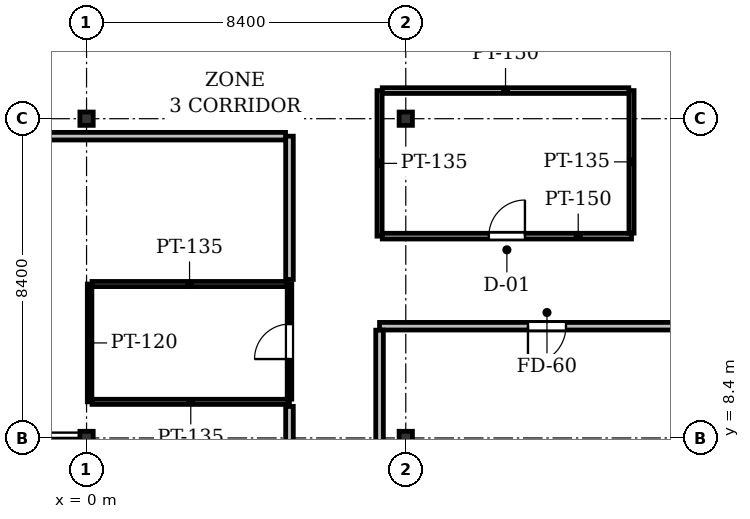
"""IFC4 building model, lengths in metres.
Left out: names, types, materials, properties, quantities, classifications, styles, units other than length and angle.
Written with IfcOpenShell. Run it as: python <this file> out.ifc"""

import sys

from ifc_helpers import new_model, si_unit, direction, frame, frame_2d, origin, origin_2d, place, context, subcontext, project, spatial, rectangle, i_section, extrude, element, fill, save


model = new_model("IFC4")
c1 = context("Model", 3, precision=1e-05, world=origin(), true_north=direction((0.0, 1.0)))
c2 = subcontext(c1, "Body", "Model", "MODEL_VIEW")
j1 = project(units=[si_unit("LENGTHUNIT", "METRE"), si_unit("PLANEANGLEUNIT", "RADIAN")], contexts=[c1])
p1 = place(None, origin())
s1 = spatial("IfcSite", under=j1, at=p1, CompositionType="ELEMENT")
p2 = place(p1, origin())
s2 = spatial("IfcBuilding", under=s1, at=p2, CompositionType="ELEMENT")
p3 = place(p2, frame((0.0, 0.0, 196.0)))
s3 = spatial("IfcBuildingStorey", under=s2, at=p3, CompositionType="ELEMENT", Elevation=196.0)
for number, where, z_axis, x_axis in (
    (1, (0.0, 8.4, 0.0), (0.0, 0.0, 1.0), (1.0, 0.0, 0.0)),
    (2, (0.0, 16.8, 0.0), (0.0, 0.0, 1.0), (1.0, 0.0, 0.0)),
    (3, (8.4, 8.4, 0.0), (0.0, 0.0, 1.0), (1.0, 0.0, 0.0)),
    (4, (8.4, 16.8, 0.0), (0.0, 0.0, 1.0), (1.0, 0.0, 0.0)),
):
    element("IfcColumn", number, at=place(p3, frame(where, z_axis=z_axis, x_axis=x_axis)), inside=s3, PredefinedType="COLUMN", context=c2, shape_type="SweptSolid", body=[
        extrude(i_section(OverallWidth=0.35, OverallDepth=0.35, WebThickness=0.02, FlangeThickness=0.032, at=origin_2d()), origin(), (0.0, 0.0, 1.0), 4.1),
    ])
p4 = place(p3, frame((0.08, 12.45, 0.0), z_axis=(0.0, 0.0, 1.0), x_axis=(0.0, -1.0, 0.0)))
e5 = element("IfcWall", 5, at=p4, inside=s3, PredefinedType="PARTITIONING", context=c2, shape_type="SweptSolid", body=[
    extrude(rectangle(XDim=3.1, YDim=0.12, at=frame_2d((1.55, 0.0))), origin(), (0.0, 0.0, 1.0), 3.223),
])
p5 = place(p3, frame((0.144, 9.35, 0.0), z_axis=(0.0, 0.0, 1.0), x_axis=(1.0, 0.0, 0.0)))
e6 = element("IfcWall", 6, at=p5, inside=s3, PredefinedType="PARTITIONING", context=c2, shape_type="SweptSolid", body=[
    extrude(rectangle(XDim=5.196, YDim=0.135, at=frame_2d((2.598, 0.0))), origin(), (0.0, 0.0, 1.0), 3.518),
])
p6 = place(p3, frame((5.34, 9.421, 0.0), z_axis=(0.0, 0.0, 1.0), x_axis=(0.0, 1.0, 0.0)))
e7 = element("IfcWall", 7, at=p6, inside=s3, PredefinedType="PARTITIONING", context=c2, shape_type="SweptSolid", body=[
    extrude(rectangle(XDim=3.029, YDim=0.12, at=frame_2d((1.514, 0.0))), origin(), (0.0, 0.0, 1.0), 3.825),
])
p7 = place(p6, frame((1.054, 0.0, 0.0)))
e8 = element("IfcOpeningElement", 8, at=p7, cuts=e7, PredefinedType="OPENING", context=c2, shape_type="SweptSolid", body=[
    extrude(rectangle(XDim=0.92, YDim=2.1, at=frame_2d((0.46, 1.05))), frame((0.0, 0.07, 0.0), z_axis=(0.0, -1.0, 0.0), x_axis=(1.0, 0.0, 0.0)), (0.0, 0.0, 1.0), 0.14),
])
p8 = place(p3, frame((5.276, 12.45, 0.0), z_axis=(0.0, 0.0, 1.0), x_axis=(-1.0, 0.0, 0.0)))
e9 = element("IfcWall", 9, at=p8, inside=s3, PredefinedType="PARTITIONING", context=c2, shape_type="SweptSolid", body=[
    extrude(rectangle(XDim=5.132, YDim=0.135, at=frame_2d((2.566, 0.0))), origin(), (0.0, 0.0, 1.0), 3.518),
])
p9 = place(p3, frame((7.71, 17.54, 0.0), z_axis=(0.0, 0.0, 1.0), x_axis=(0.0, -1.0, 0.0)))
e10 = element("IfcWall", 10, at=p9, inside=s3, PredefinedType="PARTITIONING", context=c2, shape_type="SweptSolid", body=[
    extrude(rectangle(XDim=3.83, YDim=0.135, at=frame_2d((1.915, 0.0))), origin(), (0.0, 0.0, 1.0), 3.365),
])
p10 = place(p3, frame((7.781, 13.71, 0.0), z_axis=(0.0, 0.0, 1.0), x_axis=(1.0, 0.0, 0.0)))
e11 = element("IfcWall", 11, at=p10, inside=s3, PredefinedType="PARTITIONING", context=c2, shape_type="SweptSolid", body=[
    extrude(rectangle(XDim=6.559, YDim=0.15, at=frame_2d((3.279, 0.0))), origin(), (0.0, 0.0, 1.0), 3.371),
])
p11 = place(p10, frame((2.804, 0.0, 0.0)))
e12 = element("IfcOpeningElement", 12, at=p11, cuts=e11, PredefinedType="OPENING", context=c2, shape_type="SweptSolid", body=[
    extrude(rectangle(XDim=0.95, YDim=2.15, at=frame_2d((0.475, 1.075))), frame((0.0, 0.085, 0.0), z_axis=(0.0, -1.0, 0.0), x_axis=(1.0, 0.0, 0.0)), (0.0, 0.0, 1.0), 0.17),
])
p12 = place(p3, frame((14.34, 13.789, 0.0), z_axis=(0.0, 0.0, 1.0), x_axis=(0.0, 1.0, 0.0)))
e13 = element("IfcWall", 13, at=p12, inside=s3, PredefinedType="PARTITIONING", context=c2, shape_type="SweptSolid", body=[
    extrude(rectangle(XDim=3.751, YDim=0.135, at=frame_2d((1.875, 0.0))), origin(), (0.0, 0.0, 1.0), 3.365),
])
p13 = place(p3, frame((14.269, 17.54, 0.0), z_axis=(0.0, 0.0, 1.0), x_axis=(-1.0, 0.0, 0.0)))
e14 = element("IfcWall", 14, at=p13, inside=s3, PredefinedType="PARTITIONING", context=c2, shape_type="SweptSolid", body=[
    extrude(rectangle(XDim=6.487, YDim=0.15, at=frame_2d((3.244, 0.0))), origin(), (0.0, 0.0, 1.0), 3.371),
])
p14 = place(p3, frame((16.521, 11.34, 0.0), z_axis=(0.0, 0.0, 1.0), x_axis=(-1.0, 0.0, 0.0)))
e15 = element("IfcWall", 15, at=p14, inside=s3, PredefinedType="PARTITIONING", context=c2, shape_type="SweptSolid", body=[
    extrude(rectangle(XDim=8.811, YDim=0.2, at=frame_2d((4.406, 0.0))), origin(), (0.0, 0.0, 1.0), 3.371),
])
p15 = place(p14, frame((3.906, 0.0, 0.0)))
e16 = element("IfcOpeningElement", 16, at=p15, cuts=e15, PredefinedType="OPENING", context=c2, shape_type="SweptSolid", body=[
    extrude(rectangle(XDim=1.0, YDim=2.15, at=frame_2d((0.5, 1.075))), frame((0.0, 0.11, 0.0), z_axis=(0.0, -1.0, 0.0), x_axis=(1.0, 0.0, 0.0)), (0.0, 0.0, 1.0), 0.22),
])
p16 = place(p3, frame((7.71, 11.236, 0.0), z_axis=(0.0, 0.0, 1.0), x_axis=(0.0, -1.0, 0.0)))
e17 = element("IfcWall", 17, at=p16, inside=s3, PredefinedType="PARTITIONING", context=c2, shape_type="SweptSolid", body=[
    extrude(rectangle(XDim=5.836, YDim=0.2, at=frame_2d((2.918, 0.0))), origin(), (0.0, 0.0, 1.0), 3.213),
])
p17 = place(p3, frame((5.34, 5.4, 0.0), z_axis=(0.0, 0.0, 1.0), x_axis=(0.0, 1.0, 0.0)))
e18 = element("IfcWall", 18, at=p17, inside=s3, PredefinedType="PARTITIONING", context=c2, shape_type="SweptSolid", body=[
    extrude(rectangle(XDim=3.83, YDim=0.2, at=frame_2d((1.915, 0.0))), origin(), (0.0, 0.0, 1.0), 3.213),
])
p18 = place(p3, frame((5.34, 12.57, 0.0), z_axis=(0.0, 0.0, 1.0), x_axis=(0.0, 1.0, 0.0)))
e19 = element("IfcWall", 19, at=p18, inside=s3, PredefinedType="PARTITIONING", context=c2, shape_type="SweptSolid", body=[
    extrude(rectangle(XDim=3.77, YDim=0.2, at=frame_2d((1.885, 0.0))), origin(), (0.0, 0.0, 1.0), 3.825),
])
p19 = place(p3, frame((5.236, 16.34, 0.0), z_axis=(0.0, 0.0, 1.0), x_axis=(-1.0, 0.0, 0.0)))
e20 = element("IfcWall", 20, at=p19, inside=s3, PredefinedType="PARTITIONING", context=c2, shape_type="SweptSolid", body=[
    extrude(rectangle(XDim=8.436, YDim=0.2, at=frame_2d((4.218, 0.0))), origin(), (0.0, 0.0, 1.0), 3.223),
])
p20 = place(p7, origin())
e21 = element("IfcDoor", 21, at=p20, inside=s3, OperationType="SINGLE_SWING_LEFT", PredefinedType="DOOR", context=c2, shape_type="SweptSolid", body=[
    extrude(rectangle(XDim=0.92, YDim=2.1, at=frame_2d((0.46, 1.05))), frame((0.0, 0.025, 0.0), z_axis=(0.0, -1.0, 0.0), x_axis=(1.0, 0.0, 0.0)), (0.0, 0.0, 1.0), 0.05),
])
fill(e8, e21)
p21 = place(p11, origin())
e22 = element("IfcDoor", 22, at=p21, inside=s3, OperationType="SINGLE_SWING_RIGHT", PredefinedType="DOOR", context=c2, shape_type="SweptSolid", body=[
    extrude(rectangle(XDim=0.95, YDim=2.15, at=frame_2d((0.475, 1.075))), frame((0.0, 0.025, 0.0), z_axis=(0.0, -1.0, 0.0), x_axis=(1.0, 0.0, 0.0)), (0.0, 0.0, 1.0), 0.05),
])
fill(e12, e22)
p22 = place(p15, origin())
e23 = element("IfcDoor", 23, at=p22, inside=s3, OperationType="SINGLE_SWING_RIGHT", PredefinedType="DOOR", context=c2, shape_type="SweptSolid", body=[
    extrude(rectangle(XDim=1.0, YDim=2.15, at=frame_2d((0.5, 1.075))), frame((0.0, 0.025, 0.0), z_axis=(0.0, -1.0, 0.0), x_axis=(1.0, 0.0, 0.0)), (0.0, 0.0, 1.0), 0.05),
])
fill(e16, e23)
save(model, sys.argv[1])
